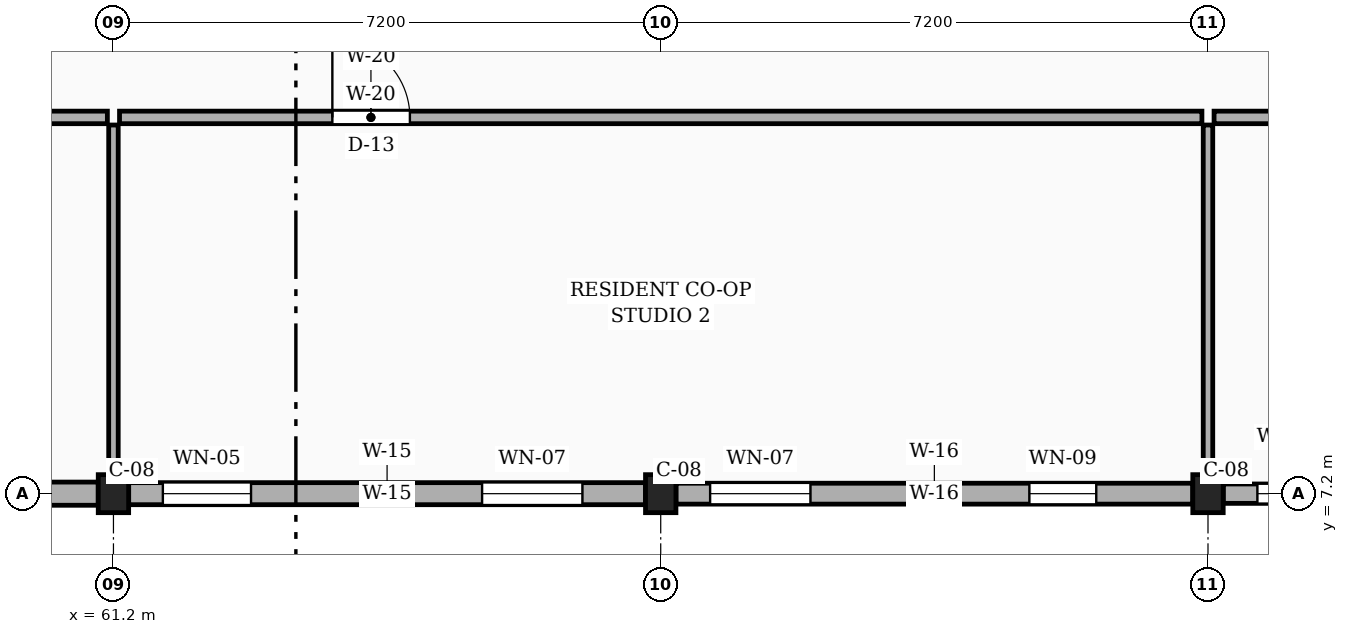
"""IFC4 building model, lengths in metres.
Left out: names, types, materials, properties, quantities, classifications, styles, units other than length and angle.
Written with IfcOpenShell. Run it as: python <this file> out.ifc"""

import sys

from ifc_helpers import new_model, si_unit, direction, frame, frame_2d, origin, origin_2d, place, context, subcontext, project, spatial, rectangle, extrude, element, fill, save


model = new_model("IFC4")
c1 = context("Model", 3, precision=1e-05, world=origin(), true_north=direction((0.0, 1.0)))
c2 = subcontext(c1, "Body", "Model", "MODEL_VIEW")
j1 = project(units=[si_unit("LENGTHUNIT", "METRE"), si_unit("PLANEANGLEUNIT", "RADIAN")], contexts=[c1])
p1 = place(None, origin())
s1 = spatial("IfcSite", under=j1, at=p1, CompositionType="ELEMENT")
p2 = place(p1, origin())
s2 = spatial("IfcBuilding", under=s1, at=p2, CompositionType="ELEMENT")
p3 = place(p2, frame((0.0, 0.0, 4.5)))
s3 = spatial("IfcBuildingStorey", under=s2, at=p3, CompositionType="ELEMENT", Elevation=4.5)
for number, where, z_axis, x_axis in (
    (1, (61.2, 7.2, 0.0), (0.0, 0.0, 1.0), (1.0, 0.0, 0.0)),
    (2, (68.4, 7.2, 0.0), (0.0, 0.0, 1.0), (1.0, 0.0, 0.0)),
    (3, (75.6, 7.2, 0.0), (0.0, 0.0, 1.0), (1.0, 0.0, 0.0)),
):
    element("IfcColumn", number, at=place(p3, frame(where, z_axis=z_axis, x_axis=x_axis)), inside=s3, PredefinedType="COLUMN", context=c2, shape_type="SweptSolid", body=[
        extrude(rectangle(XDim=0.4, YDim=0.5, at=origin_2d()), origin(), (0.0, 0.0, 1.0), 3.15),
    ])
p4 = place(p3, frame((54.2, 7.2, 0.0), z_axis=(0.0, 0.0, 1.0), x_axis=(1.0, 0.0, 0.0)))
e4 = element("IfcWall", 4, at=p4, inside=s3, PredefinedType="SOLIDWALL", context=c2, shape_type="SweptSolid", body=[
    extrude(rectangle(XDim=6.8, YDim=0.305, at=frame_2d((3.4, 0.0))), origin(), (0.0, 0.0, 1.0), 2.34),
])
p5 = place(p4, frame((0.45, 0.0, 0.78)))
e5 = element("IfcOpeningElement", 5, at=p5, cuts=e4, PredefinedType="OPENING", context=c2, shape_type="SweptSolid", body=[
    extrude(rectangle(XDim=1.0, YDim=1.15, at=frame_2d((0.5, 0.575))), frame((0.0, 0.163, 0.0), z_axis=(0.0, -1.0, 0.0), x_axis=(1.0, 0.0, 0.0)), (0.0, 0.0, 1.0), 0.325),
])
p6 = place(p4, frame((4.65, 0.0, 0.78)))
e6 = element("IfcOpeningElement", 6, at=p6, cuts=e4, PredefinedType="OPENING", context=c2, shape_type="SweptSolid", body=[
    extrude(rectangle(XDim=1.16, YDim=1.15, at=frame_2d((0.58, 0.575))), frame((0.0, 0.163, 0.0), z_axis=(0.0, -1.0, 0.0), x_axis=(1.0, 0.0, 0.0)), (0.0, 0.0, 1.0), 0.325),
])
p7 = place(p3, frame((61.4, 7.2, 0.0), z_axis=(0.0, 0.0, 1.0), x_axis=(1.0, 0.0, 0.0)))
e7 = element("IfcWall", 7, at=p7, inside=s3, PredefinedType="SOLIDWALL", context=c2, shape_type="SweptSolid", body=[
    extrude(rectangle(XDim=6.8, YDim=0.29, at=frame_2d((3.4, 0.0))), origin(), (0.0, 0.0, 1.0), 2.34),
])
p8 = place(p7, frame((0.45, 0.0, 0.78)))
e8 = element("IfcOpeningElement", 8, at=p8, cuts=e7, PredefinedType="OPENING", context=c2, shape_type="SweptSolid", body=[
    extrude(rectangle(XDim=1.16, YDim=1.15, at=frame_2d((0.58, 0.575))), frame((0.0, 0.155, 0.0), z_axis=(0.0, -1.0, 0.0), x_axis=(1.0, 0.0, 0.0)), (0.0, 0.0, 1.0), 0.31),
])
p9 = place(p7, frame((4.65, 0.0, 0.78)))
e9 = element("IfcOpeningElement", 9, at=p9, cuts=e7, PredefinedType="OPENING", context=c2, shape_type="SweptSolid", body=[
    extrude(rectangle(XDim=1.32, YDim=1.15, at=frame_2d((0.66, 0.575))), frame((0.0, 0.155, 0.0), z_axis=(0.0, -1.0, 0.0), x_axis=(1.0, 0.0, 0.0)), (0.0, 0.0, 1.0), 0.31),
])
p10 = place(p3, frame((68.6, 7.2, 0.0), z_axis=(0.0, 0.0, 1.0), x_axis=(1.0, 0.0, 0.0)))
e10 = element("IfcWall", 10, at=p10, inside=s3, PredefinedType="SOLIDWALL", context=c2, shape_type="SweptSolid", body=[
    extrude(rectangle(XDim=6.8, YDim=0.275, at=frame_2d((3.4, 0.0))), origin(), (0.0, 0.0, 1.0), 2.34),
])
p11 = place(p10, frame((0.45, 0.0, 0.78)))
e11 = element("IfcOpeningElement", 11, at=p11, cuts=e10, PredefinedType="OPENING", context=c2, shape_type="SweptSolid", body=[
    extrude(rectangle(XDim=1.32, YDim=1.15, at=frame_2d((0.66, 0.575))), frame((0.0, 0.147, 0.0), z_axis=(0.0, -1.0, 0.0), x_axis=(1.0, 0.0, 0.0)), (0.0, 0.0, 1.0), 0.295),
])
p12 = place(p10, frame((4.65, 0.0, 0.78)))
e12 = element("IfcOpeningElement", 12, at=p12, cuts=e10, PredefinedType="OPENING", context=c2, shape_type="SweptSolid", body=[
    extrude(rectangle(XDim=0.88, YDim=1.26, at=frame_2d((0.44, 0.63))), frame((0.0, 0.147, 0.0), z_axis=(0.0, -1.0, 0.0), x_axis=(1.0, 0.0, 0.0)), (0.0, 0.0, 1.0), 0.295),
])
p13 = place(p3, frame((75.8, 7.2, 0.0), z_axis=(0.0, 0.0, 1.0), x_axis=(1.0, 0.0, 0.0)))
e13 = element("IfcWall", 13, at=p13, inside=s3, PredefinedType="SOLIDWALL", context=c2, shape_type="SweptSolid", body=[
    extrude(rectangle(XDim=6.8, YDim=0.255, at=frame_2d((3.4, 0.0))), origin(), (0.0, 0.0, 1.0), 2.34),
])
p14 = place(p13, frame((0.45, 0.0, 0.78)))
e14 = element("IfcOpeningElement", 14, at=p14, cuts=e13, PredefinedType="OPENING", context=c2, shape_type="SweptSolid", body=[
    extrude(rectangle(XDim=0.88, YDim=1.26, at=frame_2d((0.44, 0.63))), frame((0.0, 0.137, 0.0), z_axis=(0.0, -1.0, 0.0), x_axis=(1.0, 0.0, 0.0)), (0.0, 0.0, 1.0), 0.275),
])
p15 = place(p13, frame((4.65, 0.0, 0.78)))
e15 = element("IfcOpeningElement", 15, at=p15, cuts=e13, PredefinedType="OPENING", context=c2, shape_type="SweptSolid", body=[
    extrude(rectangle(XDim=1.04, YDim=1.26, at=frame_2d((0.52, 0.63))), frame((0.0, 0.137, 0.0), z_axis=(0.0, -1.0, 0.0), x_axis=(1.0, 0.0, 0.0)), (0.0, 0.0, 1.0), 0.275),
])
p16 = place(p3, frame((46.975, 12.15, 0.0), z_axis=(0.0, 0.0, 1.0), x_axis=(1.0, 0.0, 0.0)))
e16 = element("IfcWall", 16, at=p16, inside=s3, PredefinedType="PARTITIONING", context=c2, shape_type="SweptSolid", body=[
    extrude(rectangle(XDim=14.145, YDim=0.165, at=frame_2d((7.073, 0.0))), origin(), (0.0, 0.0, 1.0), 2.29),
])
p17 = place(p16, frame((2.8, 0.0, 0.0)))
e17 = element("IfcOpeningElement", 17, at=p17, cuts=e16, PredefinedType="OPENING", context=c2, shape_type="SweptSolid", body=[
    extrude(rectangle(XDim=1.02, YDim=2.15, at=frame_2d((0.51, 1.075))), frame((0.0, 0.093, 0.0), z_axis=(0.0, -1.0, 0.0), x_axis=(1.0, 0.0, 0.0)), (0.0, 0.0, 1.0), 0.185),
])
p18 = place(p3, frame((61.28, 12.15, 0.0), z_axis=(0.0, 0.0, 1.0), x_axis=(1.0, 0.0, 0.0)))
e18 = element("IfcWall", 18, at=p18, inside=s3, PredefinedType="PARTITIONING", context=c2, shape_type="SweptSolid", body=[
    extrude(rectangle(XDim=14.24, YDim=0.165, at=frame_2d((7.12, 0.0))), origin(), (0.0, 0.0, 1.0), 2.29),
])
p19 = place(p18, frame((2.8, 0.0, 0.0)))
e19 = element("IfcOpeningElement", 19, at=p19, cuts=e18, PredefinedType="OPENING", context=c2, shape_type="SweptSolid", body=[
    extrude(rectangle(XDim=1.02, YDim=2.15, at=frame_2d((0.51, 1.075))), frame((0.0, 0.093, 0.0), z_axis=(0.0, -1.0, 0.0), x_axis=(1.0, 0.0, 0.0)), (0.0, 0.0, 1.0), 0.185),
])
p20 = place(p3, frame((75.68, 12.15, 0.0), z_axis=(0.0, 0.0, 1.0), x_axis=(1.0, 0.0, 0.0)))
e20 = element("IfcWall", 20, at=p20, inside=s3, PredefinedType="PARTITIONING", context=c2, shape_type="SweptSolid", body=[
    extrude(rectangle(XDim=14.145, YDim=0.165, at=frame_2d((7.073, 0.0))), origin(), (0.0, 0.0, 1.0), 2.29),
])
p21 = place(p20, frame((2.8, 0.0, 0.0)))
e21 = element("IfcOpeningElement", 21, at=p21, cuts=e20, PredefinedType="OPENING", context=c2, shape_type="SweptSolid", body=[
    extrude(rectangle(XDim=1.02, YDim=2.15, at=frame_2d((0.51, 1.075))), frame((0.0, 0.093, 0.0), z_axis=(0.0, -1.0, 0.0), x_axis=(1.0, 0.0, 0.0)), (0.0, 0.0, 1.0), 0.185),
])
for number, where, z_axis, x_axis in (
    (22, (61.2, 7.55, 0.0), (0.0, 0.0, 1.0), (0.0, 1.0, 0.0)),
    (23, (75.6, 7.55, 0.0), (0.0, 0.0, 1.0), (0.0, 1.0, 0.0)),
):
    element("IfcWall", number, at=place(p3, frame(where, z_axis=z_axis, x_axis=x_axis)), inside=s3, PredefinedType="PARTITIONING", context=c2, shape_type="SweptSolid", body=[
        extrude(rectangle(XDim=4.5, YDim=0.125, at=frame_2d((2.25, 0.0))), origin(), (0.0, 0.0, 1.0), 2.29),
    ])
p22 = place(p8, origin())
e24 = element("IfcWindow", 24, at=p22, inside=s3, PartitioningType="SINGLE_PANEL", PredefinedType="WINDOW", context=c2, shape_type="SweptSolid", body=[
    extrude(rectangle(XDim=1.16, YDim=1.15, at=frame_2d((0.58, 0.575))), frame((0.0, 0.03, 0.0), z_axis=(0.0, -1.0, 0.0), x_axis=(1.0, 0.0, 0.0)), (0.0, 0.0, 1.0), 0.06),
])
fill(e8, e24)
p23 = place(p9, origin())
e25 = element("IfcWindow", 25, at=p23, inside=s3, PartitioningType="SINGLE_PANEL", PredefinedType="WINDOW", context=c2, shape_type="SweptSolid", body=[
    extrude(rectangle(XDim=1.32, YDim=1.15, at=frame_2d((0.66, 0.575))), frame((0.0, 0.03, 0.0), z_axis=(0.0, -1.0, 0.0), x_axis=(1.0, 0.0, 0.0)), (0.0, 0.0, 1.0), 0.06),
])
fill(e9, e25)
p24 = place(p11, origin())
e26 = element("IfcWindow", 26, at=p24, inside=s3, PartitioningType="SINGLE_PANEL", PredefinedType="WINDOW", context=c2, shape_type="SweptSolid", body=[
    extrude(rectangle(XDim=1.32, YDim=1.15, at=frame_2d((0.66, 0.575))), frame((0.0, 0.03, 0.0), z_axis=(0.0, -1.0, 0.0), x_axis=(1.0, 0.0, 0.0)), (0.0, 0.0, 1.0), 0.06),
])
fill(e11, e26)
p25 = place(p12, origin())
e27 = element("IfcWindow", 27, at=p25, inside=s3, PartitioningType="SINGLE_PANEL", PredefinedType="WINDOW", context=c2, shape_type="SweptSolid", body=[
    extrude(rectangle(XDim=0.88, YDim=1.26, at=frame_2d((0.44, 0.63))), frame((0.0, 0.03, 0.0), z_axis=(0.0, -1.0, 0.0), x_axis=(1.0, 0.0, 0.0)), (0.0, 0.0, 1.0), 0.06),
])
fill(e12, e27)
p26 = place(p14, origin())
e28 = element("IfcWindow", 28, at=p26, inside=s3, PartitioningType="SINGLE_PANEL", PredefinedType="WINDOW", context=c2, shape_type="SweptSolid", body=[
    extrude(rectangle(XDim=0.88, YDim=1.26, at=frame_2d((0.44, 0.63))), frame((0.0, 0.03, 0.0), z_axis=(0.0, -1.0, 0.0), x_axis=(1.0, 0.0, 0.0)), (0.0, 0.0, 1.0), 0.06),
])
fill(e14, e28)
p27 = place(p19, origin())
e29 = element("IfcDoor", 29, at=p27, inside=s3, OperationType="SINGLE_SWING_LEFT", PredefinedType="DOOR", context=c2, shape_type="SweptSolid", body=[
    extrude(rectangle(XDim=1.02, YDim=2.15, at=frame_2d((0.51, 1.075))), frame((0.0, 0.025, 0.0), z_axis=(0.0, -1.0, 0.0), x_axis=(1.0, 0.0, 0.0)), (0.0, 0.0, 1.0), 0.05),
])
fill(e19, e29)
save(model, sys.argv[1])
